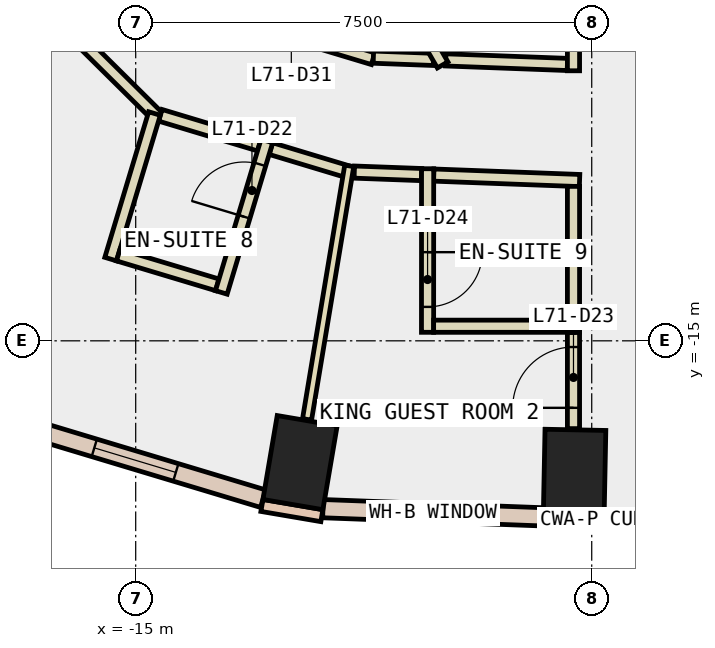
"""IFC4 building model, lengths in metres.
Left out: names, types, materials, properties, quantities, classifications, styles, units other than length and angle.
Written with IfcOpenShell. Run it as: python <this file> out.ifc"""

import sys

from ifc_helpers import new_model, si_unit, direction, frame, frame_2d, origin, origin_2d, place, context, subcontext, project, spatial, rectangle, extrude, element, fill, save


model = new_model("IFC4")
c1 = context("Model", 3, precision=1e-05, world=origin(), true_north=direction((0.0, 1.0)))
c2 = subcontext(c1, "Body", "Model", "MODEL_VIEW")
j1 = project(units=[si_unit("LENGTHUNIT", "METRE"), si_unit("PLANEANGLEUNIT", "RADIAN")], contexts=[c1])
p1 = place(None, origin())
s1 = spatial("IfcSite", under=j1, at=p1, CompositionType="ELEMENT")
p2 = place(p1, origin())
s2 = spatial("IfcBuilding", under=s1, at=p2, CompositionType="ELEMENT")
p3 = place(p2, frame((0.0, 0.0, 304.4)))
s3 = spatial("IfcBuildingStorey", under=s2, at=p3, CompositionType="ELEMENT", Elevation=304.4)
for number, where, z_axis, x_axis in (
    (1, (-12.297, -17.003, -0.34), (0.0, 0.0, 1.0), (-0.986, 0.168, 0.0)),
    (2, (-7.782, -17.164, -0.34), (0.0, 0.0, 1.0), (-1.0, 0.02, 0.0)),
):
    element("IfcColumn", number, at=place(p3, frame(where, z_axis=z_axis, x_axis=x_axis)), inside=s3, PredefinedType="COLUMN", context=c2, shape_type="SweptSolid", body=[
        extrude(rectangle(XDim=1.0, YDim=1.4, at=origin_2d()), origin(), (0.0, 0.0, 1.0), 3.6),
    ])
for number, where, z_axis, x_axis in (
    (3, (-12.924, -17.707, 0.0), (0.0, 0.0, 1.0), (0.986, -0.168, 0.0)),
    (4, (-8.298, -17.954, 0.0), (0.0, 0.0, 1.0), (1.0, -0.02, 0.0)),
):
    element("IfcWall", number, at=place(p3, frame(where, z_axis=z_axis, x_axis=x_axis)), inside=s3, PredefinedType="STANDARD", context=c2, shape_type="SweptSolid", body=[
        extrude(rectangle(XDim=1.0, YDim=0.2, at=frame_2d((0.5, 0.0))), origin(), (0.0, 0.0, 1.0), 3.26),
    ])
p4 = place(p3, frame((-11.92, -17.76, 0.0), z_axis=(0.0, 0.0, 1.0), x_axis=(0.999306787149, -0.037228284377, 0.0)))
e5 = element("IfcWall", 5, at=p4, inside=s3, PredefinedType="STANDARD", context=c2, shape_type="SweptSolid", body=[
    extrude(rectangle(XDim=3.626, YDim=0.3, at=frame_2d((1.813, 0.0))), origin(), (0.0, 0.0, 1.0), 3.26),
])
p5 = place(p4, frame((1.113, 0.0, 0.9)))
e6 = element("IfcOpeningElement", 6, at=p5, cuts=e5, PredefinedType="OPENING", context=c2, shape_type="SweptSolid", body=[
    extrude(rectangle(XDim=1.4, YDim=2.0, at=frame_2d((0.7, 1.0))), frame((0.0, 0.16, 0.0), z_axis=(0.0, -1.0, 0.0), x_axis=(1.0, 0.0, 0.0)), (0.0, 0.0, 1.0), 0.32),
])
p6 = place(p3, frame((-17.117, -16.328, 0.0), z_axis=(0.0, 0.0, 1.0), x_axis=(0.957563190743, -0.288223412884, 0.0)))
e7 = element("IfcWall", 7, at=p6, inside=s3, PredefinedType="STANDARD", context=c2, shape_type="SweptSolid", body=[
    extrude(rectangle(XDim=4.4, YDim=0.3, at=frame_2d((2.2, 0.0))), origin(), (0.0, 0.0, 1.0), 3.26),
])
p7 = place(p6, frame((1.5, 0.0, 0.9)))
e8 = element("IfcOpeningElement", 8, at=p7, cuts=e7, PredefinedType="OPENING", context=c2, shape_type="SweptSolid", body=[
    extrude(rectangle(XDim=1.4, YDim=2.0, at=frame_2d((0.7, 1.0))), frame((0.0, 0.16, 0.0), z_axis=(0.0, -1.0, 0.0), x_axis=(1.0, 0.0, 0.0)), (0.0, 0.0, 1.0), 0.32),
])
p8 = place(p3, frame((-9.902, -10.38, 0.0), z_axis=(0.0, 0.0, 1.0), x_axis=(0.999295503749, -0.037529937222, 0.0)))
e9 = element("IfcWall", 9, at=p8, inside=s3, PredefinedType="PARTITIONING", context=c2, shape_type="SweptSolid", body=[
    extrude(rectangle(XDim=2.004, YDim=0.2, at=frame_2d((1.002, 0.0))), origin(), (0.0, 0.0, 1.0), 3.26),
])
p9 = place(p3, frame((-13.787, -9.55, 0.0), z_axis=(0.0, 0.0, 1.0), x_axis=(0.957493454064, -0.288454997225, 0.0)))
e10 = element("IfcWall", 10, at=p9, inside=s3, PredefinedType="PARTITIONING", context=c2, shape_type="SweptSolid", body=[
    extrude(rectangle(XDim=2.812, YDim=0.2, at=frame_2d((1.406, 0.0))), origin(), (0.0, 0.0, 1.0), 3.26),
])
p10 = place(p9, frame((0.906, 0.0, 0.0)))
e11 = element("IfcOpeningElement", 11, at=p10, cuts=e10, PredefinedType="OPENING", context=c2, shape_type="SweptSolid", body=[
    extrude(rectangle(XDim=1.0, YDim=2.1, at=frame_2d((0.5, 1.05))), frame((0.0, 0.11, 0.0), z_axis=(0.0, -1.0, 0.0), x_axis=(1.0, 0.0, 0.0)), (0.0, 0.0, 1.0), 0.22),
])
p11 = place(p3, frame((-11.091, -10.335, 0.0), z_axis=(0.0, 0.0, 1.0), x_axis=(0.999296807198, -0.037495214686, 0.0)))
e12 = element("IfcWall", 12, at=p11, inside=s3, PredefinedType="PARTITIONING", context=c2, shape_type="SweptSolid", body=[
    extrude(rectangle(XDim=0.99, YDim=0.2, at=frame_2d((0.495, 0.0))), origin(), (0.0, 0.0, 1.0), 3.26),
])
p12 = place(p3, frame((-11.481, -12.229, 0.0), z_axis=(0.0, 0.0, 1.0), x_axis=(-0.957537616046, 0.288308365917, 0.0)))
e13 = element("IfcWall", 13, at=p12, inside=s3, PredefinedType="PARTITIONING", context=c2, shape_type="SweptSolid", body=[
    extrude(rectangle(XDim=1.352, YDim=0.2, at=frame_2d((0.676, 0.0))), origin(), (0.0, 0.0, 1.0), 3.26),
])
p13 = place(p3, frame((-14.62, -11.333, 0.0), z_axis=(0.0, 0.0, 1.0), x_axis=(-0.710808598142, 0.703385482369, 0.0)))
e14 = element("IfcWall", 14, at=p13, inside=s3, PredefinedType="PARTITIONING", context=c2, shape_type="SweptSolid", body=[
    extrude(rectangle(XDim=2.697, YDim=0.2, at=frame_2d((1.349, 0.0))), origin(), (0.0, 0.0, 1.0), 3.26),
])
p14 = place(p3, frame((-12.968, -11.781, 0.0), z_axis=(0.0, 0.0, 1.0), x_axis=(-0.957517271828, 0.288375925054, 0.0)))
e15 = element("IfcWall", 15, at=p14, inside=s3, PredefinedType="PARTITIONING", context=c2, shape_type="SweptSolid", body=[
    extrude(rectangle(XDim=1.699, YDim=0.2, at=frame_2d((0.85, 0.0))), origin(), (0.0, 0.0, 1.0), 3.26),
])
p15 = place(p3, frame((-10.299, -12.266, 0.0), z_axis=(0.0, 0.0, 1.0), x_axis=(-0.999313019426, 0.03706061529, 0.0)))
e16 = element("IfcWall", 16, at=p15, inside=s3, PredefinedType="PARTITIONING", context=c2, shape_type="SweptSolid", body=[
    extrude(rectangle(XDim=1.107, YDim=0.2, at=frame_2d((0.553, 0.0))), origin(), (0.0, 0.0, 1.0), 3.26),
])
p16 = place(p3, frame((-7.7, -12.364, 0.0), z_axis=(0.0, 0.0, 1.0), x_axis=(-0.999295758095, 0.037523164215, 0.0)))
e17 = element("IfcWall", 17, at=p16, inside=s3, PredefinedType="PARTITIONING", context=c2, shape_type="SweptSolid", body=[
    extrude(rectangle(XDim=2.401, YDim=0.2, at=frame_2d((1.2, 0.0))), origin(), (0.0, 0.0, 1.0), 3.26),
])
p17 = place(p3, frame((-7.8, -10.559, 0.0), z_axis=(0.0, 0.0, 1.0), x_axis=(0.0, 1.0, 0.0)))
e18 = element("IfcWall", 18, at=p17, inside=s3, PredefinedType="PARTITIONING", context=c2, shape_type="SweptSolid", body=[
    extrude(rectangle(XDim=4.66, YDim=0.2, at=frame_2d((2.33, 0.0))), origin(), (0.0, 0.0, 1.0), 3.26),
])
p18 = place(p17, frame((1.83, 0.0, 0.0)))
e19 = element("IfcOpeningElement", 19, at=p18, cuts=e18, PredefinedType="OPENING", context=c2, shape_type="SweptSolid", body=[
    extrude(rectangle(XDim=1.0, YDim=2.1, at=frame_2d((0.5, 1.05))), frame((0.0, 0.11, 0.0), z_axis=(0.0, -1.0, 0.0), x_axis=(1.0, 0.0, 0.0)), (0.0, 0.0, 1.0), 0.22),
])
p19 = place(p3, frame((-7.8, -16.444, 0.0), z_axis=(0.0, 0.0, 1.0), x_axis=(0.0, 1.0, 0.0)))
e20 = element("IfcWall", 20, at=p19, inside=s3, PredefinedType="PARTITIONING", context=c2, shape_type="SweptSolid", body=[
    extrude(rectangle(XDim=1.584, YDim=0.2, at=frame_2d((0.792, 0.0))), origin(), (0.0, 0.0, 1.0), 3.26),
])
p20 = place(p19, frame((0.342, 0.0, 0.0)))
e21 = element("IfcOpeningElement", 21, at=p20, cuts=e20, PredefinedType="OPENING", context=c2, shape_type="SweptSolid", body=[
    extrude(rectangle(XDim=1.0, YDim=2.1, at=frame_2d((0.5, 1.05))), frame((0.0, 0.11, 0.0), z_axis=(0.0, -1.0, 0.0), x_axis=(1.0, 0.0, 0.0)), (0.0, 0.0, 1.0), 0.22),
])
p21 = place(p3, frame((-7.8, -14.86, 0.0), z_axis=(0.0, 0.0, 1.0), x_axis=(0.0, 1.0, 0.0)))
e22 = element("IfcWall", 22, at=p21, inside=s3, PredefinedType="PARTITIONING", context=c2, shape_type="SweptSolid", body=[
    extrude(rectangle(XDim=2.4, YDim=0.2, at=frame_2d((1.2, 0.0))), origin(), (0.0, 0.0, 1.0), 3.26),
])
p22 = place(p3, frame((-9.952, -10.463, 0.0), z_axis=(0.0, 0.0, 1.0), x_axis=(-0.499837150608, 0.866119404512, 0.0)))
e23 = element("IfcWall", 23, at=p22, inside=s3, PredefinedType="PARTITIONING", context=c2, shape_type="SweptSolid", body=[
    extrude(rectangle(XDim=3.685, YDim=0.2, at=frame_2d((1.843, 0.0))), origin(), (0.0, 0.0, 1.0), 3.26),
])
p23 = place(p3, frame((-14.691, -11.262, 0.0), z_axis=(0.0, 0.0, 1.0), x_axis=(-0.288440595492, -0.95749779262, 0.0)))
e24 = element("IfcWall", 24, at=p23, inside=s3, PredefinedType="PARTITIONING", context=c2, shape_type="SweptSolid", body=[
    extrude(rectangle(XDim=2.5, YDim=0.2, at=frame_2d((1.25, 0.0))), origin(), (0.0, 0.0, 1.0), 3.26),
])
p24 = place(p3, frame((-15.287, -13.59, 0.0), z_axis=(0.0, 0.0, 1.0), x_axis=(0.957735328181, -0.287650901536, 0.0)))
e25 = element("IfcWall", 25, at=p24, inside=s3, PredefinedType="PARTITIONING", context=c2, shape_type="SweptSolid", body=[
    extrude(rectangle(XDim=1.7, YDim=0.2, at=frame_2d((0.85, 0.0))), origin(), (0.0, 0.0, 1.0), 3.26),
])
p25 = place(p3, frame((-13.592, -14.204, 0.0), z_axis=(0.0, 0.0, 1.0), x_axis=(0.288062768188, 0.95761152958, 0.0)))
e26 = element("IfcWall", 26, at=p25, inside=s3, PredefinedType="PARTITIONING", context=c2, shape_type="SweptSolid", body=[
    extrude(rectangle(XDim=2.6, YDim=0.2, at=frame_2d((1.3, 0.0))), origin(), (0.0, 0.0, 1.0), 3.26),
])
p26 = place(p25, frame((1.3, 0.0, 0.0)))
e27 = element("IfcOpeningElement", 27, at=p26, cuts=e26, PredefinedType="OPENING", context=c2, shape_type="SweptSolid", body=[
    extrude(rectangle(XDim=0.9, YDim=2.1, at=frame_2d((0.45, 1.05))), frame((0.0, 0.11, 0.0), z_axis=(0.0, -1.0, 0.0), x_axis=(1.0, 0.0, 0.0)), (0.0, 0.0, 1.0), 0.22),
])
p27 = place(p3, frame((-11.488, -12.123, 0.0), z_axis=(0.0, 0.0, 1.0), x_axis=(-0.164174159643, -0.986431368776, 0.0)))
e28 = element("IfcWall", 28, at=p27, inside=s3, PredefinedType="PARTITIONING", context=c2, shape_type="SweptSolid", body=[
    extrude(rectangle(XDim=4.226, YDim=0.15, at=frame_2d((2.113, 0.0))), origin(), (0.0, 0.0, 1.0), 3.26),
])
p28 = place(p3, frame((-10.199, -12.17, 0.0), z_axis=(0.0, 0.0, 1.0), x_axis=(-0.000363009324, -0.999999934112, 0.0)))
e29 = element("IfcWall", 29, at=p28, inside=s3, PredefinedType="PARTITIONING", context=c2, shape_type="SweptSolid", body=[
    extrude(rectangle(XDim=2.69, YDim=0.2, at=frame_2d((1.345, 0.0))), origin(), (0.0, 0.0, 1.0), 3.26),
])
p29 = place(p28, frame((1.372, 0.0, 0.0)))
e30 = element("IfcOpeningElement", 30, at=p29, cuts=e29, PredefinedType="OPENING", context=c2, shape_type="SweptSolid", body=[
    extrude(rectangle(XDim=0.9, YDim=2.1, at=frame_2d((0.45, 1.05))), frame((0.0, 0.11, 0.0), z_axis=(0.0, -1.0, 0.0), x_axis=(1.0, 0.0, 0.0)), (0.0, 0.0, 1.0), 0.22),
])
p30 = place(p3, frame((-10.1, -14.76, 0.0), z_axis=(0.0, 0.0, 1.0), x_axis=(1.0, 0.0, 0.0)))
e31 = element("IfcWall", 31, at=p30, inside=s3, PredefinedType="PARTITIONING", context=c2, shape_type="SweptSolid", body=[
    extrude(rectangle(XDim=2.3, YDim=0.2, at=frame_2d((1.15, 0.0))), origin(), (0.0, 0.0, 1.0), 3.26),
])
p31 = place(p5, origin())
e32 = element("IfcWindow", 32, at=p31, inside=s3, PartitioningType="SINGLE_PANEL", PredefinedType="WINDOW", context=c2, shape_type="SweptSolid", body=[
    extrude(rectangle(XDim=1.4, YDim=2.0, at=frame_2d((0.7, 1.0))), frame((0.0, 0.03, 0.0), z_axis=(0.0, -1.0, 0.0), x_axis=(1.0, 0.0, 0.0)), (0.0, 0.0, 1.0), 0.06),
])
fill(e6, e32)
p32 = place(p7, origin())
e33 = element("IfcWindow", 33, at=p32, inside=s3, PartitioningType="SINGLE_PANEL", PredefinedType="WINDOW", context=c2, shape_type="SweptSolid", body=[
    extrude(rectangle(XDim=1.4, YDim=2.0, at=frame_2d((0.7, 1.0))), frame((0.0, 0.03, 0.0), z_axis=(0.0, -1.0, 0.0), x_axis=(1.0, 0.0, 0.0)), (0.0, 0.0, 1.0), 0.06),
])
fill(e8, e33)
p33 = place(p26, origin())
e34 = element("IfcDoor", 34, at=p33, inside=s3, OperationType="SINGLE_SWING_RIGHT", PredefinedType="DOOR", context=c2, shape_type="SweptSolid", body=[
    extrude(rectangle(XDim=0.9, YDim=2.1, at=frame_2d((0.45, 1.05))), frame((0.0, 0.025, 0.0), z_axis=(0.0, -1.0, 0.0), x_axis=(1.0, 0.0, 0.0)), (0.0, 0.0, 1.0), 0.05),
])
fill(e27, e34)
p34 = place(p20, origin())
e35 = element("IfcDoor", 35, at=p34, inside=s3, OperationType="SINGLE_SWING_RIGHT", PredefinedType="DOOR", context=c2, shape_type="SweptSolid", body=[
    extrude(rectangle(XDim=1.0, YDim=2.1, at=frame_2d((0.5, 1.05))), frame((0.0, 0.025, 0.0), z_axis=(0.0, -1.0, 0.0), x_axis=(1.0, 0.0, 0.0)), (0.0, 0.0, 1.0), 0.05),
])
fill(e21, e35)
p35 = place(p29, origin())
e36 = element("IfcDoor", 36, at=p35, inside=s3, OperationType="SINGLE_SWING_RIGHT", PredefinedType="DOOR", context=c2, shape_type="SweptSolid", body=[
    extrude(rectangle(XDim=0.9, YDim=2.1, at=frame_2d((0.45, 1.05))), frame((0.0, 0.025, 0.0), z_axis=(0.0, -1.0, 0.0), x_axis=(1.0, 0.0, 0.0)), (0.0, 0.0, 1.0), 0.05),
])
fill(e30, e36)
save(model, sys.argv[1])
